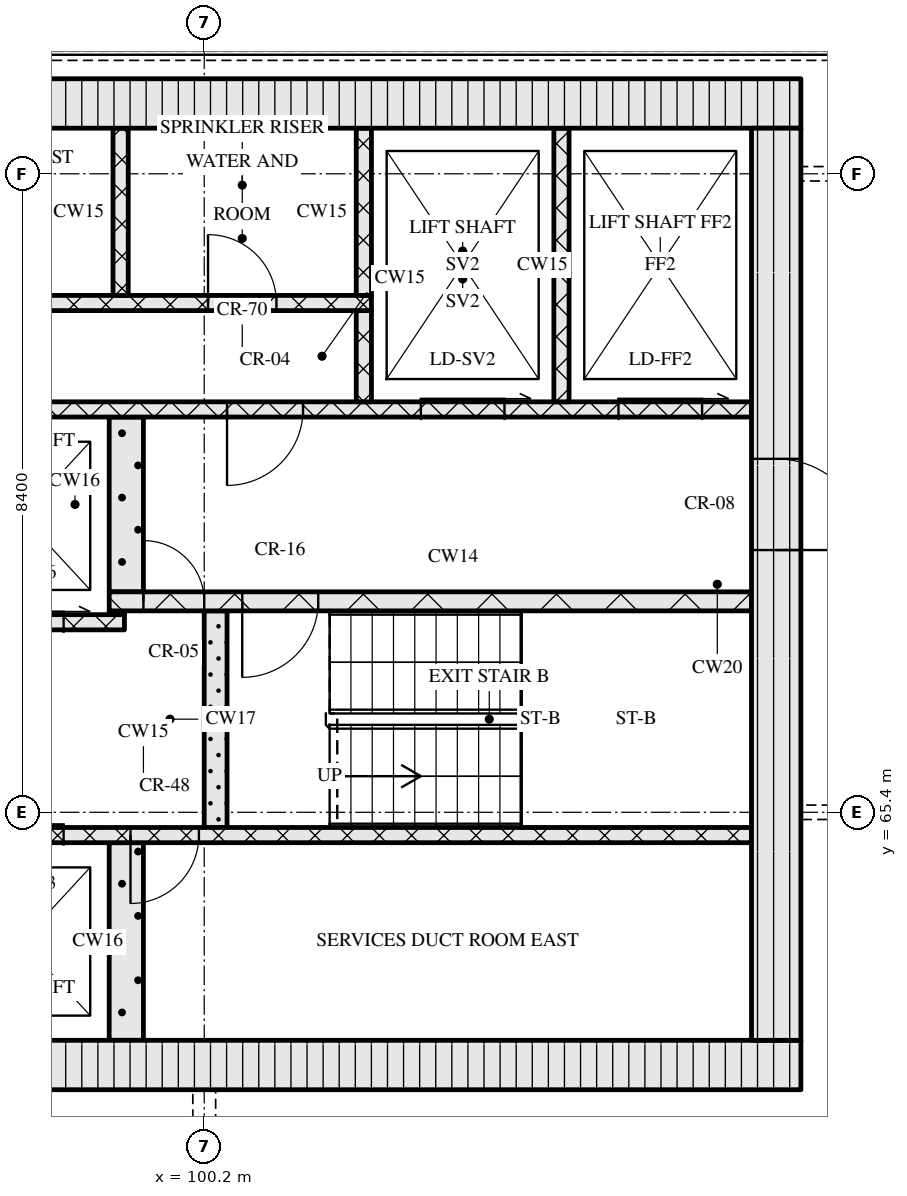
"""IFC4 building model, lengths in metres.
Left out: names, types, materials, properties, quantities, classifications, styles, units other than length and angle.
Written with IfcOpenShell. Run it as: python <this file> out.ifc"""

import sys

from ifc_helpers import new_model, si_unit, direction, frame, frame_2d, origin, place, context, subcontext, project, spatial, rectangle, extrude, element, fill, save


model = new_model("IFC4")
c1 = context("Model", 3, precision=1e-05, world=origin(), true_north=direction((0.0, 1.0)))
c2 = subcontext(c1, "Body", "Model", "MODEL_VIEW")
j1 = project(units=[si_unit("LENGTHUNIT", "METRE"), si_unit("PLANEANGLEUNIT", "RADIAN")], contexts=[c1])
p1 = place(None, origin())
s1 = spatial("IfcSite", under=j1, at=p1, CompositionType="ELEMENT")
p2 = place(p1, origin())
s2 = spatial("IfcBuilding", under=s1, at=p2, CompositionType="ELEMENT")
p3 = place(p2, frame((0.0, 0.0, 223.5)))
s3 = spatial("IfcBuildingStorey", under=s2, at=p3, CompositionType="ELEMENT", Elevation=223.5)
p4 = place(p3, frame((67.15, 62.075, 0.0), z_axis=(0.0, 0.0, 1.0), x_axis=(1.0, 0.0, 0.0)))
e1 = element("IfcWall", 1, at=p4, inside=s3, PredefinedType="SOLIDWALL", context=c2, shape_type="SweptSolid", body=[
    extrude(rectangle(XDim=40.9, YDim=0.65, at=frame_2d((20.45, 0.0))), origin(), (0.0, 0.0, 1.0), 3.32),
])
p5 = place(p4, frame((20.8, 0.0, 0.0)))
e2 = element("IfcOpeningElement", 2, at=p5, cuts=e1, PredefinedType="OPENING", context=c2, shape_type="SweptSolid", body=[
    extrude(rectangle(XDim=1.8, YDim=2.1, at=frame_2d((0.9, 1.05))), frame((0.0, 0.335, 0.0), z_axis=(0.0, -1.0, 0.0), x_axis=(1.0, 0.0, 0.0)), (0.0, 0.0, 1.0), 0.67),
])
p6 = place(p3, frame((67.15, 74.725, 0.0), z_axis=(0.0, 0.0, 1.0), x_axis=(1.0, 0.0, 0.0)))
e3 = element("IfcWall", 3, at=p6, inside=s3, PredefinedType="SOLIDWALL", context=c2, shape_type="SweptSolid", body=[
    extrude(rectangle(XDim=40.9, YDim=0.65, at=frame_2d((20.45, 0.0))), origin(), (0.0, 0.0, 1.0), 3.32),
])
p7 = place(p3, frame((107.725, 62.4, 0.0), z_axis=(0.0, 0.0, 1.0), x_axis=(0.0, 1.0, 0.0)))
e4 = element("IfcWall", 4, at=p7, inside=s3, PredefinedType="SOLIDWALL", context=c2, shape_type="SweptSolid", body=[
    extrude(rectangle(XDim=12.0, YDim=0.65, at=frame_2d((6.0, 0.0))), origin(), (0.0, 0.0, 1.0), 3.32),
])
p8 = place(p7, frame((6.45, 0.0, 0.0)))
e5 = element("IfcOpeningElement", 5, at=p8, cuts=e4, PredefinedType="OPENING", context=c2, shape_type="SweptSolid", body=[
    extrude(rectangle(XDim=1.2, YDim=2.1, at=frame_2d((0.6, 1.05))), frame((0.0, 0.335, 0.0), z_axis=(0.0, -1.0, 0.0), x_axis=(1.0, 0.0, 0.0)), (0.0, 0.0, 1.0), 0.67),
])
p9 = place(p3, frame((99.175, 62.4, 0.0), z_axis=(0.0, 0.0, 1.0), x_axis=(0.0, 1.0, 0.0)))
e6 = element("IfcWall", 6, at=p9, inside=s3, PredefinedType="SOLIDWALL", context=c2, shape_type="SweptSolid", body=[
    extrude(rectangle(XDim=2.6, YDim=0.45, at=frame_2d((1.3, 0.0))), origin(), (0.0, 0.0, 1.0), 3.32),
])
p10 = place(p3, frame((91.4, 65.1, 0.0), z_axis=(0.0, 0.0, 1.0), x_axis=(1.0, 0.0, 0.0)))
e7 = element("IfcWall", 7, at=p10, inside=s3, PredefinedType="SOLIDWALL", context=c2, shape_type="SweptSolid", body=[
    extrude(rectangle(XDim=16.0, YDim=0.2, at=frame_2d((8.0, 0.0))), origin(), (0.0, 0.0, 1.0), 3.32),
])
p11 = place(p10, frame((0.85, 0.0, 0.0)))
e8 = element("IfcOpeningElement", 8, at=p11, cuts=e7, PredefinedType="OPENING", context=c2, shape_type="SweptSolid", body=[
    extrude(rectangle(XDim=1.1, YDim=2.1, at=frame_2d((0.55, 1.05))), frame((0.0, 0.11, 0.0), z_axis=(0.0, -1.0, 0.0), x_axis=(1.0, 0.0, 0.0)), (0.0, 0.0, 1.0), 0.22),
])
p12 = place(p10, frame((3.35, 0.0, 0.0)))
e9 = element("IfcOpeningElement", 9, at=p12, cuts=e7, PredefinedType="OPENING", context=c2, shape_type="SweptSolid", body=[
    extrude(rectangle(XDim=1.1, YDim=2.1, at=frame_2d((0.55, 1.05))), frame((0.0, 0.11, 0.0), z_axis=(0.0, -1.0, 0.0), x_axis=(1.0, 0.0, 0.0)), (0.0, 0.0, 1.0), 0.22),
])
p13 = place(p10, frame((5.85, 0.0, 0.0)))
e10 = element("IfcOpeningElement", 10, at=p13, cuts=e7, PredefinedType="OPENING", context=c2, shape_type="SweptSolid", body=[
    extrude(rectangle(XDim=1.1, YDim=2.1, at=frame_2d((0.55, 1.05))), frame((0.0, 0.11, 0.0), z_axis=(0.0, -1.0, 0.0), x_axis=(1.0, 0.0, 0.0)), (0.0, 0.0, 1.0), 0.22),
])
p14 = place(p10, frame((7.83, 0.0, 0.0)))
e11 = element("IfcOpeningElement", 11, at=p14, cuts=e7, PredefinedType="OPENING", context=c2, shape_type="SweptSolid", body=[
    extrude(rectangle(XDim=0.9, YDim=2.1, at=frame_2d((0.45, 1.05))), frame((0.0, 0.11, 0.0), z_axis=(0.0, -1.0, 0.0), x_axis=(1.0, 0.0, 0.0)), (0.0, 0.0, 1.0), 0.22),
])
p15 = place(p3, frame((100.35, 65.2, 0.0), z_axis=(0.0, 0.0, 1.0), x_axis=(0.0, 1.0, 0.0)))
e12 = element("IfcWall", 12, at=p15, inside=s3, PredefinedType="SOLIDWALL", context=c2, shape_type="SweptSolid", body=[
    extrude(rectangle(XDim=2.85, YDim=0.3, at=frame_2d((1.425, 0.0))), origin(), (0.0, 0.0, 1.0), 3.32),
])
p16 = place(p3, frame((76.05, 67.9, 0.0), z_axis=(0.0, 0.0, 1.0), x_axis=(1.0, 0.0, 0.0)))
e13 = element("IfcWall", 13, at=p16, inside=s3, PredefinedType="SOLIDWALL", context=c2, shape_type="SweptSolid", body=[
    extrude(rectangle(XDim=23.1, YDim=0.2, at=frame_2d((11.55, 0.0))), origin(), (0.0, 0.0, 1.0), 3.32),
])
p17 = place(p16, frame((3.2, 0.0, 0.0)))
e14 = element("IfcOpeningElement", 14, at=p17, cuts=e13, PredefinedType="OPENING", context=c2, shape_type="SweptSolid", body=[
    extrude(rectangle(XDim=0.9, YDim=2.1, at=frame_2d((0.45, 1.05))), frame((0.0, 0.11, 0.0), z_axis=(0.0, -1.0, 0.0), x_axis=(1.0, 0.0, 0.0)), (0.0, 0.0, 1.0), 0.22),
])
p18 = place(p16, frame((9.7, 0.0, 0.0)))
e15 = element("IfcOpeningElement", 15, at=p18, cuts=e13, PredefinedType="OPENING", context=c2, shape_type="SweptSolid", body=[
    extrude(rectangle(XDim=0.9, YDim=2.1, at=frame_2d((0.45, 1.05))), frame((0.0, 0.11, 0.0), z_axis=(0.0, -1.0, 0.0), x_axis=(1.0, 0.0, 0.0)), (0.0, 0.0, 1.0), 0.22),
])
p19 = place(p16, frame((13.55, 0.0, 0.0)))
e16 = element("IfcOpeningElement", 16, at=p19, cuts=e13, PredefinedType="OPENING", context=c2, shape_type="SweptSolid", body=[
    extrude(rectangle(XDim=1.0, YDim=2.1, at=frame_2d((0.5, 1.05))), frame((0.0, 0.11, 0.0), z_axis=(0.0, -1.0, 0.0), x_axis=(1.0, 0.0, 0.0)), (0.0, 0.0, 1.0), 0.22),
])
p20 = place(p16, frame((16.2, 0.0, 0.0)))
e17 = element("IfcOpeningElement", 17, at=p20, cuts=e13, PredefinedType="OPENING", context=c2, shape_type="SweptSolid", body=[
    extrude(rectangle(XDim=1.1, YDim=2.1, at=frame_2d((0.55, 1.05))), frame((0.0, 0.11, 0.0), z_axis=(0.0, -1.0, 0.0), x_axis=(1.0, 0.0, 0.0)), (0.0, 0.0, 1.0), 0.22),
])
p21 = place(p16, frame((18.7, 0.0, 0.0)))
e18 = element("IfcOpeningElement", 18, at=p21, cuts=e13, PredefinedType="OPENING", context=c2, shape_type="SweptSolid", body=[
    extrude(rectangle(XDim=1.1, YDim=2.1, at=frame_2d((0.55, 1.05))), frame((0.0, 0.11, 0.0), z_axis=(0.0, -1.0, 0.0), x_axis=(1.0, 0.0, 0.0)), (0.0, 0.0, 1.0), 0.22),
])
p22 = place(p16, frame((21.2, 0.0, 0.0)))
e19 = element("IfcOpeningElement", 19, at=p22, cuts=e13, PredefinedType="OPENING", context=c2, shape_type="SweptSolid", body=[
    extrude(rectangle(XDim=1.1, YDim=2.1, at=frame_2d((0.55, 1.05))), frame((0.0, 0.11, 0.0), z_axis=(0.0, -1.0, 0.0), x_axis=(1.0, 0.0, 0.0)), (0.0, 0.0, 1.0), 0.22),
])
p23 = place(p3, frame((98.95, 68.025, 0.0), z_axis=(0.0, 0.0, 1.0), x_axis=(1.0, 0.0, 0.0)))
e20 = element("IfcWall", 20, at=p23, inside=s3, PredefinedType="SOLIDWALL", context=c2, shape_type="SweptSolid", body=[
    extrude(rectangle(XDim=0.2, YDim=0.05, at=frame_2d((0.1, 0.0))), origin(), (0.0, 0.0, 1.0), 3.32),
])
p24 = place(p3, frame((98.95, 68.175, 0.0), z_axis=(0.0, 0.0, 1.0), x_axis=(1.0, 0.0, 0.0)))
e21 = element("IfcWall", 21, at=p24, inside=s3, PredefinedType="SOLIDWALL", context=c2, shape_type="SweptSolid", body=[
    extrude(rectangle(XDim=8.45, YDim=0.25, at=frame_2d((4.225, 0.0))), origin(), (0.0, 0.0, 1.0), 3.32),
])
p25 = place(p24, frame((0.45, 0.0, 0.0)))
e22 = element("IfcOpeningElement", 22, at=p25, cuts=e21, PredefinedType="OPENING", context=c2, shape_type="SweptSolid", body=[
    extrude(rectangle(XDim=0.8, YDim=2.1, at=frame_2d((0.4, 1.05))), frame((0.0, 0.135, 0.0), z_axis=(0.0, -1.0, 0.0), x_axis=(1.0, 0.0, 0.0)), (0.0, 0.0, 1.0), 0.27),
])
p26 = place(p24, frame((1.75, 0.0, 0.0)))
e23 = element("IfcOpeningElement", 23, at=p26, cuts=e21, PredefinedType="OPENING", context=c2, shape_type="SweptSolid", body=[
    extrude(rectangle(XDim=1.0, YDim=2.1, at=frame_2d((0.5, 1.05))), frame((0.0, 0.135, 0.0), z_axis=(0.0, -1.0, 0.0), x_axis=(1.0, 0.0, 0.0)), (0.0, 0.0, 1.0), 0.27),
])
p27 = place(p3, frame((99.175, 68.3, 0.0), z_axis=(0.0, 0.0, 1.0), x_axis=(0.0, 1.0, 0.0)))
e24 = element("IfcWall", 24, at=p27, inside=s3, PredefinedType="SOLIDWALL", context=c2, shape_type="SweptSolid", body=[
    extrude(rectangle(XDim=2.3, YDim=0.45, at=frame_2d((1.15, 0.0))), origin(), (0.0, 0.0, 1.0), 3.32),
])
p28 = place(p3, frame((67.8, 70.7, 0.0), z_axis=(0.0, 0.0, 1.0), x_axis=(1.0, 0.0, 0.0)))
e25 = element("IfcWall", 25, at=p28, inside=s3, PredefinedType="SOLIDWALL", context=c2, shape_type="SweptSolid", body=[
    extrude(rectangle(XDim=39.6, YDim=0.2, at=frame_2d((19.8, 0.0))), origin(), (0.0, 0.0, 1.0), 3.32),
])
p29 = place(p28, frame((0.65, 0.0, 0.0)))
e26 = element("IfcOpeningElement", 26, at=p29, cuts=e25, PredefinedType="OPENING", context=c2, shape_type="SweptSolid", body=[
    extrude(rectangle(XDim=1.1, YDim=2.1, at=frame_2d((0.55, 1.05))), frame((0.0, 0.11, 0.0), z_axis=(0.0, -1.0, 0.0), x_axis=(1.0, 0.0, 0.0)), (0.0, 0.0, 1.0), 0.22),
])
p30 = place(p28, frame((3.25, 0.0, 0.0)))
e27 = element("IfcOpeningElement", 27, at=p30, cuts=e25, PredefinedType="OPENING", context=c2, shape_type="SweptSolid", body=[
    extrude(rectangle(XDim=1.1, YDim=2.1, at=frame_2d((0.55, 1.05))), frame((0.0, 0.11, 0.0), z_axis=(0.0, -1.0, 0.0), x_axis=(1.0, 0.0, 0.0)), (0.0, 0.0, 1.0), 0.22),
])
p31 = place(p28, frame((5.9, 0.0, 0.0)))
e28 = element("IfcOpeningElement", 28, at=p31, cuts=e25, PredefinedType="OPENING", context=c2, shape_type="SweptSolid", body=[
    extrude(rectangle(XDim=1.0, YDim=2.1, at=frame_2d((0.5, 1.05))), frame((0.0, 0.11, 0.0), z_axis=(0.0, -1.0, 0.0), x_axis=(1.0, 0.0, 0.0)), (0.0, 0.0, 1.0), 0.22),
])
p32 = place(p28, frame((21.7, 0.0, 0.0)))
e29 = element("IfcOpeningElement", 29, at=p32, cuts=e25, PredefinedType="OPENING", context=c2, shape_type="SweptSolid", body=[
    extrude(rectangle(XDim=1.0, YDim=2.1, at=frame_2d((0.5, 1.05))), frame((0.0, 0.11, 0.0), z_axis=(0.0, -1.0, 0.0), x_axis=(1.0, 0.0, 0.0)), (0.0, 0.0, 1.0), 0.22),
])
p33 = place(p28, frame((32.7, 0.0, 0.0)))
e30 = element("IfcOpeningElement", 30, at=p33, cuts=e25, PredefinedType="OPENING", context=c2, shape_type="SweptSolid", body=[
    extrude(rectangle(XDim=1.0, YDim=2.1, at=frame_2d((0.5, 1.05))), frame((0.0, 0.11, 0.0), z_axis=(0.0, -1.0, 0.0), x_axis=(1.0, 0.0, 0.0)), (0.0, 0.0, 1.0), 0.22),
])
p34 = place(p28, frame((35.25, 0.0, 0.0)))
e31 = element("IfcOpeningElement", 31, at=p34, cuts=e25, PredefinedType="OPENING", context=c2, shape_type="SweptSolid", body=[
    extrude(rectangle(XDim=1.1, YDim=2.1, at=frame_2d((0.55, 1.05))), frame((0.0, 0.11, 0.0), z_axis=(0.0, -1.0, 0.0), x_axis=(1.0, 0.0, 0.0)), (0.0, 0.0, 1.0), 0.22),
])
p35 = place(p28, frame((37.85, 0.0, 0.0)))
e32 = element("IfcOpeningElement", 32, at=p35, cuts=e25, PredefinedType="OPENING", context=c2, shape_type="SweptSolid", body=[
    extrude(rectangle(XDim=1.1, YDim=2.1, at=frame_2d((0.55, 1.05))), frame((0.0, 0.11, 0.0), z_axis=(0.0, -1.0, 0.0), x_axis=(1.0, 0.0, 0.0)), (0.0, 0.0, 1.0), 0.22),
])
p36 = place(p3, frame((102.3, 70.8, 0.0), z_axis=(0.0, 0.0, 1.0), x_axis=(0.0, 1.0, 0.0)))
e33 = element("IfcWall", 33, at=p36, inside=s3, PredefinedType="SOLIDWALL", context=c2, shape_type="SweptSolid", body=[
    extrude(rectangle(XDim=1.2, YDim=0.2, at=frame_2d((0.6, 0.0))), origin(), (0.0, 0.0, 1.0), 3.32),
])
p37 = place(p3, frame((104.9, 70.8, 0.0), z_axis=(0.0, 0.0, 1.0), x_axis=(0.0, 1.0, 0.0)))
e34 = element("IfcWall", 34, at=p37, inside=s3, PredefinedType="SOLIDWALL", context=c2, shape_type="SweptSolid", body=[
    extrude(rectangle(XDim=3.6, YDim=0.2, at=frame_2d((1.8, 0.0))), origin(), (0.0, 0.0, 1.0), 3.32),
])
p38 = place(p3, frame((90.7, 72.1, 0.0), z_axis=(0.0, 0.0, 1.0), x_axis=(1.0, 0.0, 0.0)))
e35 = element("IfcWall", 35, at=p38, inside=s3, PredefinedType="SOLIDWALL", context=c2, shape_type="SweptSolid", body=[
    extrude(rectangle(XDim=11.7, YDim=0.2, at=frame_2d((5.85, 0.0))), origin(), (0.0, 0.0, 1.0), 3.32),
])
p39 = place(p38, frame((1.6, 0.0, 0.0)))
e36 = element("IfcOpeningElement", 36, at=p39, cuts=e35, PredefinedType="OPENING", context=c2, shape_type="SweptSolid", body=[
    extrude(rectangle(XDim=0.9, YDim=2.1, at=frame_2d((0.45, 1.05))), frame((0.0, 0.11, 0.0), z_axis=(0.0, -1.0, 0.0), x_axis=(1.0, 0.0, 0.0)), (0.0, 0.0, 1.0), 0.22),
])
p40 = place(p38, frame((5.335, 0.0, 0.0)))
e37 = element("IfcOpeningElement", 37, at=p40, cuts=e35, PredefinedType="OPENING", context=c2, shape_type="SweptSolid", body=[
    extrude(rectangle(XDim=0.9, YDim=2.1, at=frame_2d((0.45, 1.05))), frame((0.0, 0.11, 0.0), z_axis=(0.0, -1.0, 0.0), x_axis=(1.0, 0.0, 0.0)), (0.0, 0.0, 1.0), 0.22),
])
p41 = place(p38, frame((9.55, 0.0, 0.0)))
e38 = element("IfcOpeningElement", 38, at=p41, cuts=e35, PredefinedType="OPENING", context=c2, shape_type="SweptSolid", body=[
    extrude(rectangle(XDim=0.9, YDim=2.1, at=frame_2d((0.45, 1.05))), frame((0.0, 0.11, 0.0), z_axis=(0.0, -1.0, 0.0), x_axis=(1.0, 0.0, 0.0)), (0.0, 0.0, 1.0), 0.22),
])
for number, where, z_axis, x_axis in (
    (39, (99.1, 72.2, 0.0), (0.0, 0.0, 1.0), (0.0, 1.0, 0.0)),
    (40, (102.3, 72.2, 0.0), (0.0, 0.0, 1.0), (0.0, 1.0, 0.0)),
):
    element("IfcWall", number, at=place(p3, frame(where, z_axis=z_axis, x_axis=x_axis)), inside=s3, PredefinedType="SOLIDWALL", context=c2, shape_type="SweptSolid", body=[
        extrude(rectangle(XDim=2.2, YDim=0.2, at=frame_2d((1.1, 0.0))), origin(), (0.0, 0.0, 1.0), 3.32),
    ])
p42 = place(p13, origin())
e41 = element("IfcDoor", 41, at=p42, inside=s3, OperationType="SLIDING_TO_LEFT", PredefinedType="DOOR", context=c2, shape_type="SweptSolid", body=[
    extrude(rectangle(XDim=1.1, YDim=2.1, at=frame_2d((0.55, 1.05))), frame((0.0, 0.025, 0.0), z_axis=(0.0, -1.0, 0.0), x_axis=(1.0, 0.0, 0.0)), (0.0, 0.0, 1.0), 0.05),
])
fill(e10, e41)
p43 = place(p14, origin())
e42 = element("IfcDoor", 42, at=p43, inside=s3, OperationType="SINGLE_SWING_RIGHT", PredefinedType="DOOR", context=c2, shape_type="SweptSolid", body=[
    extrude(rectangle(XDim=0.9, YDim=2.1, at=frame_2d((0.45, 1.05))), frame((0.0, 0.025, 0.0), z_axis=(0.0, -1.0, 0.0), x_axis=(1.0, 0.0, 0.0)), (0.0, 0.0, 1.0), 0.05),
])
fill(e11, e42)
p44 = place(p22, origin())
e43 = element("IfcDoor", 43, at=p44, inside=s3, OperationType="SLIDING_TO_RIGHT", PredefinedType="DOOR", context=c2, shape_type="SweptSolid", body=[
    extrude(rectangle(XDim=1.1, YDim=2.1, at=frame_2d((0.55, 1.05))), frame((0.0, 0.025, 0.0), z_axis=(0.0, -1.0, 0.0), x_axis=(1.0, 0.0, 0.0)), (0.0, 0.0, 1.0), 0.05),
])
fill(e19, e43)
p45 = place(p25, origin())
e44 = element("IfcDoor", 44, at=p45, inside=s3, OperationType="SINGLE_SWING_LEFT", PredefinedType="DOOR", context=c2, shape_type="SweptSolid", body=[
    extrude(rectangle(XDim=0.8, YDim=2.1, at=frame_2d((0.4, 1.05))), frame((0.0, 0.025, 0.0), z_axis=(0.0, -1.0, 0.0), x_axis=(1.0, 0.0, 0.0)), (0.0, 0.0, 1.0), 0.05),
])
fill(e22, e44)
p46 = place(p26, origin())
e45 = element("IfcDoor", 45, at=p46, inside=s3, OperationType="SINGLE_SWING_RIGHT", PredefinedType="DOOR", context=c2, shape_type="SweptSolid", body=[
    extrude(rectangle(XDim=1.0, YDim=2.1, at=frame_2d((0.5, 1.05))), frame((0.0, 0.025, 0.0), z_axis=(0.0, -1.0, 0.0), x_axis=(1.0, 0.0, 0.0)), (0.0, 0.0, 1.0), 0.05),
])
fill(e23, e45)
p47 = place(p8, origin())
e46 = element("IfcDoor", 46, at=p47, inside=s3, OperationType="SINGLE_SWING_RIGHT", PredefinedType="DOOR", context=c2, shape_type="SweptSolid", body=[
    extrude(rectangle(XDim=1.2, YDim=2.1, at=frame_2d((0.6, 1.05))), frame((0.0, 0.025, 0.0), z_axis=(0.0, -1.0, 0.0), x_axis=(1.0, 0.0, 0.0)), (0.0, 0.0, 1.0), 0.05),
])
fill(e5, e46)
p48 = place(p33, origin())
e47 = element("IfcDoor", 47, at=p48, inside=s3, OperationType="SINGLE_SWING_RIGHT", PredefinedType="DOOR", context=c2, shape_type="SweptSolid", body=[
    extrude(rectangle(XDim=1.0, YDim=2.1, at=frame_2d((0.5, 1.05))), frame((0.0, 0.025, 0.0), z_axis=(0.0, -1.0, 0.0), x_axis=(1.0, 0.0, 0.0)), (0.0, 0.0, 1.0), 0.05),
])
fill(e30, e47)
p49 = place(p34, origin())
e48 = element("IfcDoor", 48, at=p49, inside=s3, OperationType="SLIDING_TO_RIGHT", PredefinedType="DOOR", context=c2, shape_type="SweptSolid", body=[
    extrude(rectangle(XDim=1.1, YDim=2.1, at=frame_2d((0.55, 1.05))), frame((0.0, 0.025, 0.0), z_axis=(0.0, -1.0, 0.0), x_axis=(1.0, 0.0, 0.0)), (0.0, 0.0, 1.0), 0.05),
])
fill(e31, e48)
p50 = place(p35, origin())
e49 = element("IfcDoor", 49, at=p50, inside=s3, OperationType="SLIDING_TO_RIGHT", PredefinedType="DOOR", context=c2, shape_type="SweptSolid", body=[
    extrude(rectangle(XDim=1.1, YDim=2.1, at=frame_2d((0.55, 1.05))), frame((0.0, 0.025, 0.0), z_axis=(0.0, -1.0, 0.0), x_axis=(1.0, 0.0, 0.0)), (0.0, 0.0, 1.0), 0.05),
])
fill(e32, e49)
p51 = place(p41, origin())
e50 = element("IfcDoor", 50, at=p51, inside=s3, OperationType="SINGLE_SWING_LEFT", PredefinedType="DOOR", context=c2, shape_type="SweptSolid", body=[
    extrude(rectangle(XDim=0.9, YDim=2.1, at=frame_2d((0.45, 1.05))), frame((0.0, 0.025, 0.0), z_axis=(0.0, -1.0, 0.0), x_axis=(1.0, 0.0, 0.0)), (0.0, 0.0, 1.0), 0.05),
])
fill(e38, e50)
save(model, sys.argv[1])
